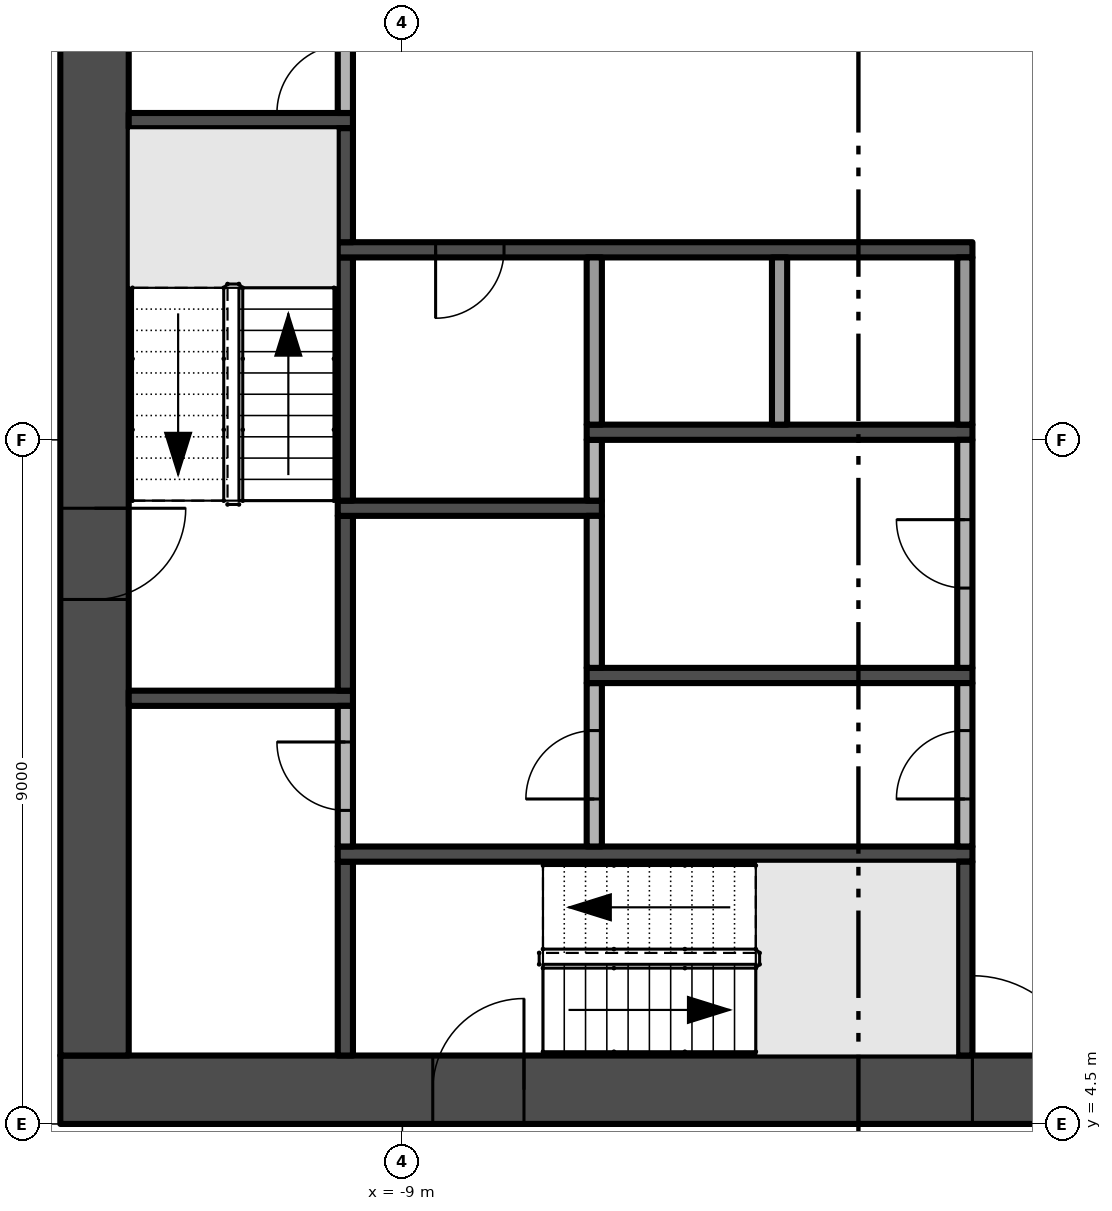
"""IFC4 building model, lengths in metres.
Left out: names, types, materials, properties, quantities, classifications, styles, units other than length and angle.
Written with IfcOpenShell. Run it as: python <this file> out.ifc"""

import sys

from ifc_helpers import new_model, si_unit, direction, frame, frame_2d, origin, place, context, subcontext, project, spatial, rectangle, extrude, element, fill, save


model = new_model("IFC4")
c1 = context("Model", 3, precision=1e-05, world=origin(), true_north=direction((0.0, 1.0)))
c2 = subcontext(c1, "Body", "Model", "MODEL_VIEW")
j1 = project(units=[si_unit("LENGTHUNIT", "METRE"), si_unit("PLANEANGLEUNIT", "RADIAN")], contexts=[c1])
p1 = place(None, origin())
s1 = spatial("IfcSite", under=j1, at=p1, CompositionType="ELEMENT")
p2 = place(p1, origin())
s2 = spatial("IfcBuilding", under=s1, at=p2, CompositionType="ELEMENT")
p3 = place(p2, frame((0.0, 0.0, 18.8)))
s3 = spatial("IfcBuildingStorey", under=s2, at=p3, CompositionType="ELEMENT", Elevation=18.8)
p4 = place(p3, frame((-13.5, 4.95, -0.3), z_axis=(0.0, 0.0, 1.0), x_axis=(1.0, 0.0, 0.0)))
e1 = element("IfcWall", 1, at=p4, inside=s3, PredefinedType="SHEAR", context=c2, shape_type="SweptSolid", body=[
    extrude(rectangle(XDim=27.0, YDim=0.9, at=frame_2d((13.5, 0.0))), origin(), (0.0, 0.0, 1.0), 3.8),
])
p5 = place(p4, frame((12.0, 0.0, 0.3)))
e2 = element("IfcOpeningElement", 2, at=p5, cuts=e1, PredefinedType="OPENING", context=c2, shape_type="SweptSolid", body=[
    extrude(rectangle(XDim=3.0, YDim=2.4, at=frame_2d((1.5, 1.2))), frame((0.0, 0.46, 0.0), z_axis=(0.0, -1.0, 0.0), x_axis=(1.0, 0.0, 0.0)), (0.0, 0.0, 1.0), 0.92),
])
p6 = place(p4, frame((4.9, 0.0, 0.3)))
e3 = element("IfcOpeningElement", 3, at=p6, cuts=e1, PredefinedType="OPENING", context=c2, shape_type="SweptSolid", body=[
    extrude(rectangle(XDim=1.2, YDim=2.2, at=frame_2d((0.6, 1.1))), frame((0.0, 0.46, 0.0), z_axis=(0.0, -1.0, 0.0), x_axis=(1.0, 0.0, 0.0)), (0.0, 0.0, 1.0), 0.92),
])
p7 = place(p4, frame((20.75, 0.0, 0.3)))
e4 = element("IfcOpeningElement", 4, at=p7, cuts=e1, PredefinedType="OPENING", context=c2, shape_type="SweptSolid", body=[
    extrude(rectangle(XDim=1.5, YDim=2.2, at=frame_2d((0.75, 1.1))), frame((0.0, 0.46, 0.0), z_axis=(0.0, -1.0, 0.0), x_axis=(1.0, 0.0, 0.0)), (0.0, 0.0, 1.0), 0.92),
])
p8 = place(p4, frame((17.4, 0.0, 0.3)))
e5 = element("IfcOpeningElement", 5, at=p8, cuts=e1, PredefinedType="OPENING", context=c2, shape_type="SweptSolid", body=[
    extrude(rectangle(XDim=1.2, YDim=2.2, at=frame_2d((0.6, 1.1))), frame((0.0, 0.46, 0.0), z_axis=(0.0, -1.0, 0.0), x_axis=(1.0, 0.0, 0.0)), (0.0, 0.0, 1.0), 0.92),
])
p9 = place(p3, frame((-13.05, 21.6, -0.3), z_axis=(0.0, 0.0, 1.0), x_axis=(0.0, -1.0, 0.0)))
e6 = element("IfcWall", 6, at=p9, inside=s3, PredefinedType="SHEAR", context=c2, shape_type="SweptSolid", body=[
    extrude(rectangle(XDim=16.2, YDim=0.9, at=frame_2d((8.1, 0.0))), origin(), (0.0, 0.0, 1.0), 3.8),
])
p10 = place(p9, frame((9.0, 0.0, 0.3)))
e7 = element("IfcOpeningElement", 7, at=p10, cuts=e6, PredefinedType="OPENING", context=c2, shape_type="SweptSolid", body=[
    extrude(rectangle(XDim=1.2, YDim=2.2, at=frame_2d((0.6, 1.1))), frame((0.0, 0.46, 0.0), z_axis=(0.0, -1.0, 0.0), x_axis=(1.0, 0.0, 0.0)), (0.0, 0.0, 1.0), 0.92),
])
for number, where, z_axis, x_axis in (
    (8, (-12.6, 10.1, 0.0), (0.0, 0.0, 1.0), (1.0, 0.0, 0.0)),
    (9, (-12.6, 17.7, 0.0), (0.0, 0.0, 1.0), (1.0, 0.0, 0.0)),
):
    element("IfcWall", number, at=place(p3, frame(where, z_axis=z_axis, x_axis=x_axis)), inside=s3, PredefinedType="SHEAR", context=c2, shape_type="SweptSolid", body=[
        extrude(rectangle(XDim=2.95, YDim=0.2, at=frame_2d((1.475, 0.0))), origin(), (0.0, 0.0, 1.0), 3.5),
    ])
p11 = place(p3, frame((-9.75, 5.4, 0.0), z_axis=(0.0, 0.0, 1.0), x_axis=(0.0, 1.0, 0.0)))
e10 = element("IfcWall", 10, at=p11, inside=s3, PredefinedType="SHEAR", context=c2, shape_type="SweptSolid", body=[
    extrude(rectangle(XDim=2.55, YDim=0.2, at=frame_2d((1.275, 0.0))), origin(), (0.0, 0.0, 1.0), 3.5),
])
p12 = place(p3, frame((-9.85, 8.05, 0.0), z_axis=(0.0, 0.0, 1.0), x_axis=(1.0, 0.0, 0.0)))
e11 = element("IfcWall", 11, at=p12, inside=s3, PredefinedType="SHEAR", context=c2, shape_type="SweptSolid", body=[
    extrude(rectangle(XDim=8.35, YDim=0.2, at=frame_2d((4.175, 0.0))), origin(), (0.0, 0.0, 1.0), 3.5),
])
p13 = place(p3, frame((-9.75, 8.15, 0.0), z_axis=(0.0, 0.0, 1.0), x_axis=(0.0, 1.0, 0.0)))
e12 = element("IfcWall", 12, at=p13, inside=s3, PredefinedType="PARTITIONING", context=c2, shape_type="SweptSolid", body=[
    extrude(rectangle(XDim=1.85, YDim=0.2, at=frame_2d((0.925, 0.0))), origin(), (0.0, 0.0, 1.0), 3.5),
])
p14 = place(p13, frame((0.475, 0.0, 0.0)))
e13 = element("IfcOpeningElement", 13, at=p14, cuts=e12, PredefinedType="OPENING", context=c2, shape_type="SweptSolid", body=[
    extrude(rectangle(XDim=0.9, YDim=2.1, at=frame_2d((0.45, 1.05))), frame((0.0, 0.11, 0.0), z_axis=(0.0, -1.0, 0.0), x_axis=(1.0, 0.0, 0.0)), (0.0, 0.0, 1.0), 0.22),
])
p15 = place(p3, frame((-9.75, 10.2, 0.0), z_axis=(0.0, 0.0, 1.0), x_axis=(0.0, 1.0, 0.0)))
e14 = element("IfcWall", 14, at=p15, inside=s3, PredefinedType="SHEAR", context=c2, shape_type="SweptSolid", body=[
    extrude(rectangle(XDim=2.3, YDim=0.2, at=frame_2d((1.15, 0.0))), origin(), (0.0, 0.0, 1.0), 3.5),
])
p16 = place(p3, frame((-9.85, 12.6, 0.0), z_axis=(0.0, 0.0, 1.0), x_axis=(1.0, 0.0, 0.0)))
e15 = element("IfcWall", 15, at=p16, inside=s3, PredefinedType="SHEAR", context=c2, shape_type="SweptSolid", body=[
    extrude(rectangle(XDim=3.475, YDim=0.2, at=frame_2d((1.738, 0.0))), origin(), (0.0, 0.0, 1.0), 3.5),
])
p17 = place(p3, frame((-9.75, 12.7, 0.0), z_axis=(0.0, 0.0, 1.0), x_axis=(0.0, 1.0, 0.0)))
e16 = element("IfcWall", 16, at=p17, inside=s3, PredefinedType="SHEAR", context=c2, shape_type="SweptSolid", body=[
    extrude(rectangle(XDim=3.2, YDim=0.2, at=frame_2d((1.6, 0.0))), origin(), (0.0, 0.0, 1.0), 3.5),
])
p18 = place(p3, frame((-1.5, 16.0, 0.0), z_axis=(0.0, 0.0, 1.0), x_axis=(-1.0, 0.0, 0.0)))
e17 = element("IfcWall", 17, at=p18, inside=s3, PredefinedType="SHEAR", context=c2, shape_type="SweptSolid", body=[
    extrude(rectangle(XDim=8.35, YDim=0.2, at=frame_2d((4.175, 0.0))), origin(), (0.0, 0.0, 1.0), 3.5),
])
p19 = place(p18, frame((6.162, 0.0, 0.0)))
e18 = element("IfcOpeningElement", 18, at=p19, cuts=e17, PredefinedType="OPENING", context=c2, shape_type="SweptSolid", body=[
    extrude(rectangle(XDim=0.9, YDim=2.1, at=frame_2d((0.45, 1.05))), frame((0.0, 0.11, 0.0), z_axis=(0.0, -1.0, 0.0), x_axis=(1.0, 0.0, 0.0)), (0.0, 0.0, 1.0), 0.22),
])
p20 = place(p3, frame((-9.75, 16.1, 0.0), z_axis=(0.0, 0.0, 1.0), x_axis=(0.0, 1.0, 0.0)))
e19 = element("IfcWall", 19, at=p20, inside=s3, PredefinedType="SHEAR", context=c2, shape_type="SweptSolid", body=[
    extrude(rectangle(XDim=1.5, YDim=0.2, at=frame_2d((0.75, 0.0))), origin(), (0.0, 0.0, 1.0), 3.5),
])
p21 = place(p3, frame((-9.75, 17.8, 0.0), z_axis=(0.0, 0.0, 1.0), x_axis=(0.0, 1.0, 0.0)))
e20 = element("IfcWall", 20, at=p21, inside=s3, PredefinedType="PARTITIONING", context=c2, shape_type="SweptSolid", body=[
    extrude(rectangle(XDim=1.4, YDim=0.2, at=frame_2d((0.7, 0.0))), origin(), (0.0, 0.0, 1.0), 3.5),
])
p22 = place(p21, origin())
e21 = element("IfcOpeningElement", 21, at=p22, cuts=e20, PredefinedType="OPENING", context=c2, shape_type="SweptSolid", body=[
    extrude(rectangle(XDim=0.9, YDim=2.1, at=frame_2d((0.45, 1.05))), frame((0.0, 0.11, 0.0), z_axis=(0.0, -1.0, 0.0), x_axis=(1.0, 0.0, 0.0)), (0.0, 0.0, 1.0), 0.22),
])
p23 = place(p3, frame((-6.475, 8.15, 0.0), z_axis=(0.0, 0.0, 1.0), x_axis=(0.0, 1.0, 0.0)))
e22 = element("IfcWall", 22, at=p23, inside=s3, PredefinedType="PARTITIONING", context=c2, shape_type="SweptSolid", body=[
    extrude(rectangle(XDim=2.15, YDim=0.2, at=frame_2d((1.075, 0.0))), origin(), (0.0, 0.0, 1.0), 3.5),
])
p24 = place(p23, frame((0.625, 0.0, 0.0)))
e23 = element("IfcOpeningElement", 23, at=p24, cuts=e22, PredefinedType="OPENING", context=c2, shape_type="SweptSolid", body=[
    extrude(rectangle(XDim=0.9, YDim=2.1, at=frame_2d((0.45, 1.05))), frame((0.0, 0.11, 0.0), z_axis=(0.0, -1.0, 0.0), x_axis=(1.0, 0.0, 0.0)), (0.0, 0.0, 1.0), 0.22),
])
p25 = place(p3, frame((-6.575, 10.4, 0.0), z_axis=(0.0, 0.0, 1.0), x_axis=(1.0, 0.0, 0.0)))
e24 = element("IfcWall", 24, at=p25, inside=s3, PredefinedType="SHEAR", context=c2, shape_type="SweptSolid", body=[
    extrude(rectangle(XDim=5.075, YDim=0.2, at=frame_2d((2.538, 0.0))), origin(), (0.0, 0.0, 1.0), 3.5),
])
p26 = place(p3, frame((-6.475, 10.5, 0.0), z_axis=(0.0, 0.0, 1.0), x_axis=(0.0, 1.0, 0.0)))
e25 = element("IfcWall", 25, at=p26, inside=s3, PredefinedType="PARTITIONING", context=c2, shape_type="SweptSolid", body=[
    extrude(rectangle(XDim=2.0, YDim=0.2, at=frame_2d((1.0, 0.0))), origin(), (0.0, 0.0, 1.0), 3.5),
])
p27 = place(p3, frame((-6.475, 12.7, 0.0), z_axis=(0.0, 0.0, 1.0), x_axis=(0.0, 1.0, 0.0)))
e26 = element("IfcWall", 26, at=p27, inside=s3, PredefinedType="PARTITIONING", context=c2, shape_type="SweptSolid", body=[
    extrude(rectangle(XDim=0.8, YDim=0.2, at=frame_2d((0.4, 0.0))), origin(), (0.0, 0.0, 1.0), 3.5),
])
p28 = place(p3, frame((-6.575, 13.6, 0.0), z_axis=(0.0, 0.0, 1.0), x_axis=(1.0, 0.0, 0.0)))
e27 = element("IfcWall", 27, at=p28, inside=s3, PredefinedType="SHEAR", context=c2, shape_type="SweptSolid", body=[
    extrude(rectangle(XDim=5.075, YDim=0.2, at=frame_2d((2.538, 0.0))), origin(), (0.0, 0.0, 1.0), 3.5),
])
for number, where, z_axis, x_axis in (
    (28, (-6.475, 13.7, 0.0), (0.0, 0.0, 1.0), (0.0, 1.0, 0.0)),
    (29, (-4.037, 13.7, 0.0), (0.0, 0.0, 1.0), (0.0, 1.0, 0.0)),
):
    element("IfcWall", number, at=place(p3, frame(where, z_axis=z_axis, x_axis=x_axis)), inside=s3, PredefinedType="PARTITIONING", context=c2, shape_type="SweptSolid", body=[
        extrude(rectangle(XDim=2.2, YDim=0.2, at=frame_2d((1.1, 0.0))), origin(), (0.0, 0.0, 1.0), 3.5),
    ])
p29 = place(p3, frame((-1.6, 5.4, 0.0), z_axis=(0.0, 0.0, 1.0), x_axis=(0.0, 1.0, 0.0)))
e30 = element("IfcWall", 30, at=p29, inside=s3, PredefinedType="SHEAR", context=c2, shape_type="SweptSolid", body=[
    extrude(rectangle(XDim=2.55, YDim=0.2, at=frame_2d((1.275, 0.0))), origin(), (0.0, 0.0, 1.0), 3.5),
])
p30 = place(p3, frame((-1.6, 8.15, 0.0), z_axis=(0.0, 0.0, 1.0), x_axis=(0.0, 1.0, 0.0)))
e31 = element("IfcWall", 31, at=p30, inside=s3, PredefinedType="PARTITIONING", context=c2, shape_type="SweptSolid", body=[
    extrude(rectangle(XDim=2.15, YDim=0.2, at=frame_2d((1.075, 0.0))), origin(), (0.0, 0.0, 1.0), 3.5),
])
p31 = place(p30, frame((0.625, 0.0, 0.0)))
e32 = element("IfcOpeningElement", 32, at=p31, cuts=e31, PredefinedType="OPENING", context=c2, shape_type="SweptSolid", body=[
    extrude(rectangle(XDim=0.9, YDim=2.1, at=frame_2d((0.45, 1.05))), frame((0.0, 0.11, 0.0), z_axis=(0.0, -1.0, 0.0), x_axis=(1.0, 0.0, 0.0)), (0.0, 0.0, 1.0), 0.22),
])
p32 = place(p3, frame((-1.6, 10.5, 0.0), z_axis=(0.0, 0.0, 1.0), x_axis=(0.0, 1.0, 0.0)))
e33 = element("IfcWall", 33, at=p32, inside=s3, PredefinedType="PARTITIONING", context=c2, shape_type="SweptSolid", body=[
    extrude(rectangle(XDim=3.0, YDim=0.2, at=frame_2d((1.5, 0.0))), origin(), (0.0, 0.0, 1.0), 3.5),
])
p33 = place(p32, frame((1.05, 0.0, 0.0)))
e34 = element("IfcOpeningElement", 34, at=p33, cuts=e33, PredefinedType="OPENING", context=c2, shape_type="SweptSolid", body=[
    extrude(rectangle(XDim=0.9, YDim=2.1, at=frame_2d((0.45, 1.05))), frame((0.0, 0.11, 0.0), z_axis=(0.0, -1.0, 0.0), x_axis=(1.0, 0.0, 0.0)), (0.0, 0.0, 1.0), 0.22),
])
p34 = place(p3, frame((-1.6, 13.7, 0.0), z_axis=(0.0, 0.0, 1.0), x_axis=(0.0, 1.0, 0.0)))
e35 = element("IfcWall", 35, at=p34, inside=s3, PredefinedType="PARTITIONING", context=c2, shape_type="SweptSolid", body=[
    extrude(rectangle(XDim=2.2, YDim=0.2, at=frame_2d((1.1, 0.0))), origin(), (0.0, 0.0, 1.0), 3.5),
])
p35 = place(p5, frame((3.0, 0.0, 0.0), z_axis=(0.0, 0.0, 1.0), x_axis=(-1.0, 0.0, 0.0)))
e36 = element("IfcDoor", 36, at=p35, inside=s3, OperationType="DOUBLE_DOOR_SINGLE_SWING", PredefinedType="DOOR", context=c2, shape_type="SweptSolid", body=[
    extrude(rectangle(XDim=3.0, YDim=2.4, at=frame_2d((1.5, 1.2))), frame((0.0, 0.025, 0.0), z_axis=(0.0, -1.0, 0.0), x_axis=(1.0, 0.0, 0.0)), (0.0, 0.0, 1.0), 0.05),
])
fill(e2, e36)
p36 = place(p10, frame((1.2, 0.0, 0.0), z_axis=(0.0, 0.0, 1.0), x_axis=(-1.0, 0.0, 0.0)))
e37 = element("IfcDoor", 37, at=p36, inside=s3, OperationType="SINGLE_SWING_RIGHT", PredefinedType="DOOR", context=c2, shape_type="SweptSolid", body=[
    extrude(rectangle(XDim=1.2, YDim=2.2, at=frame_2d((0.6, 1.1))), frame((0.0, 0.025, 0.0), z_axis=(0.0, -1.0, 0.0), x_axis=(1.0, 0.0, 0.0)), (0.0, 0.0, 1.0), 0.05),
])
fill(e7, e37)
p37 = place(p6, frame((1.2, 0.0, 0.0), z_axis=(0.0, 0.0, 1.0), x_axis=(-1.0, 0.0, 0.0)))
e38 = element("IfcDoor", 38, at=p37, inside=s3, OperationType="SINGLE_SWING_LEFT", PredefinedType="DOOR", context=c2, shape_type="SweptSolid", body=[
    extrude(rectangle(XDim=1.2, YDim=2.2, at=frame_2d((0.6, 1.1))), frame((0.0, 0.025, 0.0), z_axis=(0.0, -1.0, 0.0), x_axis=(1.0, 0.0, 0.0)), (0.0, 0.0, 1.0), 0.05),
])
fill(e3, e38)
p38 = place(p19, origin())
e39 = element("IfcDoor", 39, at=p38, inside=s3, OperationType="SINGLE_SWING_RIGHT", PredefinedType="DOOR", context=c2, shape_type="SweptSolid", body=[
    extrude(rectangle(XDim=0.9, YDim=2.1, at=frame_2d((0.45, 1.05))), frame((0.0, 0.025, 0.0), z_axis=(0.0, -1.0, 0.0), x_axis=(1.0, 0.0, 0.0)), (0.0, 0.0, 1.0), 0.05),
])
fill(e18, e39)
p39 = place(p31, origin())
e40 = element("IfcDoor", 40, at=p39, inside=s3, OperationType="SINGLE_SWING_LEFT", PredefinedType="DOOR", context=c2, shape_type="SweptSolid", body=[
    extrude(rectangle(XDim=0.9, YDim=2.1, at=frame_2d((0.45, 1.05))), frame((0.0, 0.025, 0.0), z_axis=(0.0, -1.0, 0.0), x_axis=(1.0, 0.0, 0.0)), (0.0, 0.0, 1.0), 0.05),
])
fill(e32, e40)
p40 = place(p33, origin())
e41 = element("IfcDoor", 41, at=p40, inside=s3, OperationType="SINGLE_SWING_RIGHT", PredefinedType="DOOR", context=c2, shape_type="SweptSolid", body=[
    extrude(rectangle(XDim=0.9, YDim=2.1, at=frame_2d((0.45, 1.05))), frame((0.0, 0.025, 0.0), z_axis=(0.0, -1.0, 0.0), x_axis=(1.0, 0.0, 0.0)), (0.0, 0.0, 1.0), 0.05),
])
fill(e34, e41)
p41 = place(p22, origin())
e42 = element("IfcDoor", 42, at=p41, inside=s3, OperationType="SINGLE_SWING_LEFT", PredefinedType="DOOR", context=c2, shape_type="SweptSolid", body=[
    extrude(rectangle(XDim=0.9, YDim=2.1, at=frame_2d((0.45, 1.05))), frame((0.0, 0.025, 0.0), z_axis=(0.0, -1.0, 0.0), x_axis=(1.0, 0.0, 0.0)), (0.0, 0.0, 1.0), 0.05),
])
fill(e21, e42)
p42 = place(p24, origin())
e43 = element("IfcDoor", 43, at=p42, inside=s3, OperationType="SINGLE_SWING_LEFT", PredefinedType="DOOR", context=c2, shape_type="SweptSolid", body=[
    extrude(rectangle(XDim=0.9, YDim=2.1, at=frame_2d((0.45, 1.05))), frame((0.0, 0.025, 0.0), z_axis=(0.0, -1.0, 0.0), x_axis=(1.0, 0.0, 0.0)), (0.0, 0.0, 1.0), 0.05),
])
fill(e23, e43)
p43 = place(p14, origin())
e44 = element("IfcDoor", 44, at=p43, inside=s3, OperationType="SINGLE_SWING_RIGHT", PredefinedType="DOOR", context=c2, shape_type="SweptSolid", body=[
    extrude(rectangle(XDim=0.9, YDim=2.1, at=frame_2d((0.45, 1.05))), frame((0.0, 0.025, 0.0), z_axis=(0.0, -1.0, 0.0), x_axis=(1.0, 0.0, 0.0)), (0.0, 0.0, 1.0), 0.05),
])
fill(e13, e44)
save(model, sys.argv[1])
